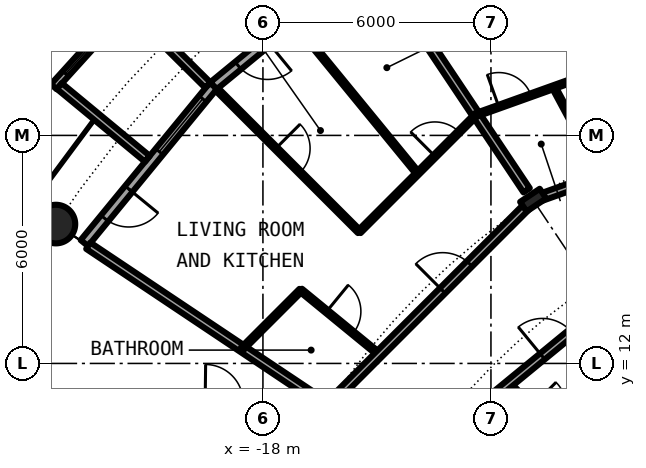
"""IFC4 building model, lengths in metres.
Left out: names, types, materials, properties, quantities, classifications, styles, units other than length and angle.
Written with IfcOpenShell. Run it as: python <this file> out.ifc"""

import sys

from ifc_helpers import new_model, si_unit, direction, frame, frame_2d, origin, origin_2d, place, context, subcontext, project, spatial, rectangle, circle, hollow_circle, i_section, extrude, element, fill, save


model = new_model("IFC4")
c1 = context("Model", 3, precision=1e-05, world=origin(), true_north=direction((0.0, 1.0)))
c2 = subcontext(c1, "Body", "Model", "MODEL_VIEW")
j1 = project(units=[si_unit("LENGTHUNIT", "METRE"), si_unit("PLANEANGLEUNIT", "RADIAN")], contexts=[c1])
p1 = place(None, origin())
s1 = spatial("IfcSite", under=j1, at=p1, CompositionType="ELEMENT")
p2 = place(p1, origin())
s2 = spatial("IfcBuilding", under=s1, at=p2, CompositionType="ELEMENT")
p3 = place(p2, frame((0.0, 0.0, 41.1)))
s3 = spatial("IfcBuildingStorey", under=s2, at=p3, CompositionType="ELEMENT", Elevation=41.1)
p4 = place(p3, frame((-23.448, 15.667, 0.0), z_axis=(0.0, 0.0, 1.0), x_axis=(1.0, 0.0, 0.0)))
e1 = element("IfcColumn", 1, at=p4, inside=s3, PredefinedType="COLUMN", context=c2, shape_type="SweptSolid", body=[
    extrude(hollow_circle(Radius=0.508, WallThickness=0.05, at=origin_2d()), origin(), (0.0, 0.0, 1.0), 3.05),
])
p5 = place(p3, frame((-10.889, 16.297, 0.0), z_axis=(0.0, 0.0, 1.0), x_axis=(-0.55557023302, 0.831469612303, 0.0)))
e2 = element("IfcColumn", 2, at=p5, inside=s3, PredefinedType="COLUMN", context=c2, shape_type="SweptSolid", body=[
    extrude(i_section(OverallWidth=0.305, OverallDepth=0.62, WebThickness=0.021, FlangeThickness=0.04, FilletRadius=0.027, at=origin_2d()), origin(), (0.0, 0.0, 1.0), 3.05),
])
p6 = place(p3, frame((-15.167, 22.699, 0.0), z_axis=(0.0, 0.0, 1.0), x_axis=(-0.773019449054, -0.634382322723, 0.0)))
e3 = element("IfcWall", 3, at=p6, inside=s3, PredefinedType="SOLIDWALL", context=c2, shape_type="SweptSolid", body=[
    extrude(rectangle(XDim=5.352, YDim=0.25, at=frame_2d((2.676, 0.0))), origin(), (0.0, 0.0, 1.0), 2.7),
])
p7 = place(p6, frame((0.441, 0.0, 0.3)))
e4 = element("IfcOpeningElement", 4, at=p7, cuts=e3, PredefinedType="OPENING", context=c2, shape_type="SweptSolid", body=[
    extrude(rectangle(XDim=1.8, YDim=2.1, at=frame_2d((0.9, 1.05))), frame((0.0, 0.135, 0.0), z_axis=(0.0, -1.0, 0.0), x_axis=(1.0, 0.0, 0.0)), (0.0, 0.0, 1.0), 0.27),
])
p8 = place(p6, frame((3.51, 0.0, 0.0)))
e5 = element("IfcOpeningElement", 5, at=p8, cuts=e3, PredefinedType="OPENING", context=c2, shape_type="SweptSolid", body=[
    extrude(rectangle(XDim=1.0, YDim=2.2, at=frame_2d((0.5, 1.1))), frame((0.0, 0.135, 0.0), z_axis=(0.0, -1.0, 0.0), x_axis=(1.0, 0.0, 0.0)), (0.0, 0.0, 1.0), 0.27),
])
p9 = place(p3, frame((-19.304, 19.304, 0.0), z_axis=(0.0, 0.0, 1.0), x_axis=(-0.634382322723, -0.773019449054, 0.0)))
e6 = element("IfcWall", 6, at=p9, inside=s3, PredefinedType="SOLIDWALL", context=c2, shape_type="SweptSolid", body=[
    extrude(rectangle(XDim=5.352, YDim=0.25, at=frame_2d((2.676, 0.0))), origin(), (0.0, 0.0, 1.0), 2.7),
])
p10 = place(p9, frame((0.441, 0.0, 0.3)))
e7 = element("IfcOpeningElement", 7, at=p10, cuts=e6, PredefinedType="OPENING", context=c2, shape_type="SweptSolid", body=[
    extrude(rectangle(XDim=1.8, YDim=2.1, at=frame_2d((0.9, 1.05))), frame((0.0, 0.135, 0.0), z_axis=(0.0, -1.0, 0.0), x_axis=(1.0, 0.0, 0.0)), (0.0, 0.0, 1.0), 0.27),
])
p11 = place(p9, frame((3.51, 0.0, 0.0)))
e8 = element("IfcOpeningElement", 8, at=p11, cuts=e6, PredefinedType="OPENING", context=c2, shape_type="SweptSolid", body=[
    extrude(rectangle(XDim=1.0, YDim=2.2, at=frame_2d((0.5, 1.1))), frame((0.0, 0.135, 0.0), z_axis=(0.0, -1.0, 0.0), x_axis=(1.0, 0.0, 0.0)), (0.0, 0.0, 1.0), 0.27),
])
p12 = place(p3, frame((-21.493, 21.5, -0.03), z_axis=(0.0, 0.0, 1.0), x_axis=(-0.671506829416, -0.740998365753, 0.0)))
e9 = element("IfcWall", 9, at=p12, inside=s3, PredefinedType="SOLIDWALL", context=c2, shape_type="SweptSolid", body=[
    extrude(rectangle(XDim=2.993, YDim=0.2, at=frame_2d((1.497, 0.0))), origin(), (0.0, 0.0, 1.0), 2.73),
])
p13 = place(p12, frame((0.457, 0.0, 0.33)))
e10 = element("IfcOpeningElement", 10, at=p13, cuts=e9, PredefinedType="OPENING", context=c2, shape_type="SweptSolid", body=[
    extrude(circle(Radius=1.04, at=frame_2d((1.04, 1.04))), frame((0.0, 0.11, 0.0), z_axis=(0.0, -1.0, 0.0), x_axis=(1.0, 0.0, 0.0)), (0.0, 0.0, 1.0), 0.22),
])
p14 = place(p3, frame((-19.45, 19.323, -0.03), z_axis=(0.0, 0.0, 1.0), x_axis=(-0.709727076896, 0.704476739375, 0.0)))
e11 = element("IfcWall", 11, at=p14, inside=s3, PredefinedType="SOLIDWALL", context=c2, shape_type="SweptSolid", body=[
    extrude(rectangle(XDim=2.883, YDim=0.2, at=frame_2d((1.441, 0.0))), origin(), (0.0, 0.0, 1.0), 2.73),
])
p15 = place(p3, frame((-21.041, 17.384, -0.03), z_axis=(0.0, 0.0, 1.0), x_axis=(-0.770784861449, 0.63709551667, 0.0)))
e12 = element("IfcWall", 12, at=p15, inside=s3, PredefinedType="SOLIDWALL", context=c2, shape_type="SweptSolid", body=[
    extrude(rectangle(XDim=3.006, YDim=0.2, at=frame_2d((1.503, 0.0))), origin(), (0.0, 0.0, 1.0), 2.73),
])
p16 = place(p3, frame((-22.595, 15.097, 0.0), z_axis=(0.0, 0.0, 1.0), x_axis=(0.831465568067, -0.555576285599, 0.0)))
e13 = element("IfcWall", 13, at=p16, inside=s3, PredefinedType="PARTITIONING", context=c2, shape_type="SweptSolid", body=[
    extrude(rectangle(XDim=7.264, YDim=0.2, at=frame_2d((3.632, 0.0))), origin(), (0.0, 0.0, 1.0), 2.7),
])
p17 = place(p3, frame((-19.216, 19.216, 0.0), z_axis=(0.0, 0.0, 1.0), x_axis=(0.707106781187, -0.707106781187, 0.0)))
e14 = element("IfcWall", 14, at=p17, inside=s3, PredefinedType="PARTITIONING", context=c2, shape_type="SweptSolid", body=[
    extrude(rectangle(XDim=5.305, YDim=0.1, at=frame_2d((2.652, 0.0))), origin(), (0.0, 0.0, 1.0), 2.7),
])
p18 = place(p17, frame((2.202, 0.0, 0.0)))
e15 = element("IfcOpeningElement", 15, at=p18, cuts=e14, PredefinedType="OPENING", context=c2, shape_type="SweptSolid", body=[
    extrude(rectangle(XDim=0.9, YDim=2.3, at=frame_2d((0.45, 1.15))), frame((0.0, 0.06, 0.0), z_axis=(0.0, -1.0, 0.0), x_axis=(1.0, 0.0, 0.0)), (0.0, 0.0, 1.0), 0.12),
])
p19 = place(p3, frame((-17.221, 21.022, 0.0), z_axis=(0.0, 0.0, 1.0), x_axis=(0.633662498939, -0.773609615658, 0.0)))
e16 = element("IfcWall", 16, at=p19, inside=s3, PredefinedType="PARTITIONING", context=c2, shape_type="SweptSolid", body=[
    extrude(rectangle(XDim=5.195, YDim=0.1, at=frame_2d((2.598, 0.0))), origin(), (0.0, 0.0, 1.0), 2.7),
])
p20 = place(p3, frame((-17.004, 13.927, 0.0), z_axis=(0.0, 0.0, 1.0), x_axis=(0.77367517848, -0.633582447834, 0.0)))
e17 = element("IfcWall", 17, at=p20, inside=s3, PredefinedType="PARTITIONING", context=c2, shape_type="SweptSolid", body=[
    extrude(rectangle(XDim=2.661, YDim=0.1, at=frame_2d((1.331, 0.0))), origin(), (0.0, 0.0, 1.0), 2.7),
])
p21 = place(p20, frame((0.881, 0.0, 0.0)))
e18 = element("IfcOpeningElement", 18, at=p21, cuts=e17, PredefinedType="OPENING", context=c2, shape_type="SweptSolid", body=[
    extrude(rectangle(XDim=0.9, YDim=2.3, at=frame_2d((0.45, 1.15))), frame((0.0, 0.06, 0.0), z_axis=(0.0, -1.0, 0.0), x_axis=(1.0, 0.0, 0.0)), (0.0, 0.0, 1.0), 0.12),
])
p22 = place(p3, frame((-15.097, 22.595, 0.0), z_axis=(0.0, 0.0, 1.0), x_axis=(0.555576285599, -0.831465568067, 0.0)))
e19 = element("IfcWall", 19, at=p22, inside=s3, PredefinedType="PARTITIONING", context=c2, shape_type="SweptSolid", body=[
    extrude(rectangle(XDim=7.264, YDim=0.2, at=frame_2d((3.632, 0.0))), origin(), (0.0, 0.0, 1.0), 2.7),
])
p23 = place(p3, frame((-11.524, 11.464, 0.0), z_axis=(0.0, 0.0, 1.0), x_axis=(0.708796844581, -0.705412668665, 0.0)))
e20 = element("IfcWall", 20, at=p23, inside=s3, PredefinedType="PARTITIONING", context=c2, shape_type="SweptSolid", body=[
    extrude(rectangle(XDim=2.597, YDim=0.1, at=frame_2d((1.299, 0.0))), origin(), (0.0, 0.0, 1.0), 2.7),
])
p24 = place(p23, frame((0.849, 0.0, 0.0)))
e21 = element("IfcOpeningElement", 21, at=p24, cuts=e20, PredefinedType="OPENING", context=c2, shape_type="SweptSolid", body=[
    extrude(rectangle(XDim=0.9, YDim=2.3, at=frame_2d((0.45, 1.15))), frame((0.0, 0.06, 0.0), z_axis=(0.0, -1.0, 0.0), x_axis=(1.0, 0.0, 0.0)), (0.0, 0.0, 1.0), 0.12),
])
p25 = place(p3, frame((-10.349, 19.272, 0.0), z_axis=(0.0, 0.0, 1.0), x_axis=(0.473203488521, -0.880953153381, 0.0)))
e22 = element("IfcWall", 22, at=p25, inside=s3, PredefinedType="PARTITIONING", context=c2, shape_type="SweptSolid", body=[
    extrude(rectangle(XDim=2.648, YDim=0.1, at=frame_2d((1.324, 0.0))), origin(), (0.0, 0.0, 1.0), 2.7),
])
p26 = place(p3, frame((-14.039, 9.4, 0.0), z_axis=(0.0, 0.0, 1.0), x_axis=(0.77298340166, 0.634426245326, 0.0)))
e23 = element("IfcWall", 23, at=p26, inside=s3, PredefinedType="PARTITIONING", context=c2, shape_type="SweptSolid", body=[
    extrude(rectangle(XDim=9.793, YDim=0.2, at=frame_2d((4.896, 0.0))), origin(), (0.0, 0.0, 1.0), 2.7),
])
p27 = place(p26, frame((4.389, 0.0, 0.0)))
e24 = element("IfcOpeningElement", 24, at=p27, cuts=e23, PredefinedType="OPENING", context=c2, shape_type="SweptSolid", body=[
    extrude(rectangle(XDim=1.0, YDim=2.3, at=frame_2d((0.5, 1.15))), frame((0.0, 0.11, 0.0), z_axis=(0.0, -1.0, 0.0), x_axis=(1.0, 0.0, 0.0)), (0.0, 0.0, 1.0), 0.22),
])
p28 = place(p3, frame((-10.742, 16.351, 0.0), z_axis=(0.0, 0.0, 1.0), x_axis=(0.941707755593, 0.336432018476, 0.0)))
e25 = element("IfcWall", 25, at=p28, inside=s3, PredefinedType="PARTITIONING", context=c2, shape_type="SweptSolid", body=[
    extrude(rectangle(XDim=9.381, YDim=0.2, at=frame_2d((4.69, 0.0))), origin(), (0.0, 0.0, 1.0), 2.38),
])
p29 = place(p28, frame((4.106, 0.0, 0.0)))
e26 = element("IfcOpeningElement", 26, at=p29, cuts=e25, PredefinedType="OPENING", context=c2, shape_type="SweptSolid", body=[
    extrude(rectangle(XDim=1.0, YDim=2.3, at=frame_2d((0.5, 1.15))), frame((0.0, 0.11, 0.0), z_axis=(0.0, -1.0, 0.0), x_axis=(1.0, 0.0, 0.0)), (0.0, 0.0, 1.0), 0.22),
])
p30 = place(p3, frame((-16.187, 10.999, 0.0), z_axis=(0.0, 0.0, 1.0), x_axis=(0.707106781187, 0.707106781187, 0.0)))
e27 = element("IfcWall", 27, at=p30, inside=s3, PredefinedType="PARTITIONING", context=c2, shape_type="SweptSolid", body=[
    extrude(rectangle(XDim=7.337, YDim=0.2, at=frame_2d((3.668, 0.0))), origin(), (0.0, 0.0, 1.0), 2.38),
])
p31 = place(p30, frame((4.124, 0.0, 0.0)))
e28 = element("IfcOpeningElement", 28, at=p31, cuts=e27, PredefinedType="OPENING", context=c2, shape_type="SweptSolid", body=[
    extrude(rectangle(XDim=1.0, YDim=2.3, at=frame_2d((0.5, 1.15))), frame((0.0, 0.11, 0.0), z_axis=(0.0, -1.0, 0.0), x_axis=(1.0, 0.0, 0.0)), (0.0, 0.0, 1.0), 0.22),
])
p32 = place(p3, frame((-12.393, 18.539, 0.0), z_axis=(0.0, 0.0, 1.0), x_axis=(0.941491894739, 0.337035624439, 0.0)))
e29 = element("IfcWall", 29, at=p32, inside=s3, PredefinedType="PARTITIONING", context=c2, shape_type="SweptSolid", body=[
    extrude(rectangle(XDim=4.335, YDim=0.1, at=frame_2d((2.167, 0.0))), origin(), (0.0, 0.0, 1.0), 2.7),
])
p33 = place(p32, frame((0.637, 0.0, 0.0)))
e30 = element("IfcOpeningElement", 30, at=p33, cuts=e29, PredefinedType="OPENING", context=c2, shape_type="SweptSolid", body=[
    extrude(rectangle(XDim=0.9, YDim=2.3, at=frame_2d((0.45, 1.15))), frame((0.0, 0.06, 0.0), z_axis=(0.0, -1.0, 0.0), x_axis=(1.0, 0.0, 0.0)), (0.0, 0.0, 1.0), 0.12),
])
p34 = place(p3, frame((-18.542, 12.389, 0.0), z_axis=(0.0, 0.0, 1.0), x_axis=(0.707106781187, 0.707106781187, 0.0)))
e31 = element("IfcWall", 31, at=p34, inside=s3, PredefinedType="PARTITIONING", context=c2, shape_type="SweptSolid", body=[
    extrude(rectangle(XDim=2.175, YDim=0.1, at=frame_2d((1.088, 0.0))), origin(), (0.0, 0.0, 1.0), 2.7),
])
p35 = place(p3, frame((-15.465, 15.465, 0.0), z_axis=(0.0, 0.0, 1.0), x_axis=(0.707022606819, 0.707190945535, 0.0)))
e32 = element("IfcWall", 32, at=p35, inside=s3, PredefinedType="PARTITIONING", context=c2, shape_type="SweptSolid", body=[
    extrude(rectangle(XDim=4.351, YDim=0.1, at=frame_2d((2.175, 0.0))), origin(), (0.0, 0.0, 1.0), 2.7),
])
p36 = place(p35, frame((2.813, 0.0, 0.0)))
e33 = element("IfcOpeningElement", 33, at=p36, cuts=e32, PredefinedType="OPENING", context=c2, shape_type="SweptSolid", body=[
    extrude(rectangle(XDim=0.9, YDim=2.3, at=frame_2d((0.45, 1.15))), frame((0.0, 0.06, 0.0), z_axis=(0.0, -1.0, 0.0), x_axis=(1.0, 0.0, 0.0)), (0.0, 0.0, 1.0), 0.12),
])
p37 = place(p8, origin())
e34 = element("IfcDoor", 34, at=p37, inside=s3, OperationType="SINGLE_SWING_LEFT", PredefinedType="DOOR", context=c2, shape_type="SweptSolid", body=[
    extrude(rectangle(XDim=1.0, YDim=2.2, at=frame_2d((0.5, 1.1))), frame((0.0, 0.025, 0.0), z_axis=(0.0, -1.0, 0.0), x_axis=(1.0, 0.0, 0.0)), (0.0, 0.0, 1.0), 0.05),
])
fill(e5, e34)
p38 = place(p10, origin())
e35 = element("IfcWindow", 35, at=p38, inside=s3, PartitioningType="SINGLE_PANEL", PredefinedType="WINDOW", context=c2, shape_type="SweptSolid", body=[
    extrude(rectangle(XDim=1.8, YDim=2.1, at=frame_2d((0.9, 1.05))), frame((0.0, 0.03, 0.0), z_axis=(0.0, -1.0, 0.0), x_axis=(1.0, 0.0, 0.0)), (0.0, 0.0, 1.0), 0.06),
])
fill(e7, e35)
p39 = place(p13, origin())
e36 = element("IfcWindow", 36, at=p39, inside=s3, PartitioningType="SINGLE_PANEL", PredefinedType="WINDOW", context=c2, shape_type="SweptSolid", body=[
    extrude(circle(Radius=1.04, at=frame_2d((1.04, 1.04))), frame((0.0, 0.03, 0.0), z_axis=(0.0, -1.0, 0.0), x_axis=(1.0, 0.0, 0.0)), (0.0, 0.0, 1.0), 0.06),
])
fill(e10, e36)
p40 = place(p11, origin())
e37 = element("IfcDoor", 37, at=p40, inside=s3, OperationType="SINGLE_SWING_LEFT", PredefinedType="DOOR", context=c2, shape_type="SweptSolid", body=[
    extrude(rectangle(XDim=1.0, YDim=2.2, at=frame_2d((0.5, 1.1))), frame((0.0, 0.025, 0.0), z_axis=(0.0, -1.0, 0.0), x_axis=(1.0, 0.0, 0.0)), (0.0, 0.0, 1.0), 0.05),
])
fill(e8, e37)
p41 = place(p33, origin())
e38 = element("IfcDoor", 38, at=p41, inside=s3, OperationType="SINGLE_SWING_LEFT", PredefinedType="DOOR", context=c2, shape_type="SweptSolid", body=[
    extrude(rectangle(XDim=0.9, YDim=2.3, at=frame_2d((0.45, 1.15))), frame((0.0, 0.025, 0.0), z_axis=(0.0, -1.0, 0.0), x_axis=(1.0, 0.0, 0.0)), (0.0, 0.0, 1.0), 0.05),
])
fill(e30, e38)
p42 = place(p31, origin())
e39 = element("IfcDoor", 39, at=p42, inside=s3, OperationType="SINGLE_SWING_RIGHT", PredefinedType="DOOR", context=c2, shape_type="SweptSolid", body=[
    extrude(rectangle(XDim=1.0, YDim=2.3, at=frame_2d((0.5, 1.15))), frame((0.0, 0.025, 0.0), z_axis=(0.0, -1.0, 0.0), x_axis=(1.0, 0.0, 0.0)), (0.0, 0.0, 1.0), 0.05),
])
fill(e28, e39)
p43 = place(p21, origin())
e40 = element("IfcDoor", 40, at=p43, inside=s3, OperationType="SINGLE_SWING_RIGHT", PredefinedType="DOOR", context=c2, shape_type="SweptSolid", body=[
    extrude(rectangle(XDim=0.9, YDim=2.3, at=frame_2d((0.45, 1.15))), frame((0.0, 0.025, 0.0), z_axis=(0.0, -1.0, 0.0), x_axis=(1.0, 0.0, 0.0)), (0.0, 0.0, 1.0), 0.05),
])
fill(e18, e40)
p44 = place(p18, origin())
e41 = element("IfcDoor", 41, at=p44, inside=s3, OperationType="SINGLE_SWING_LEFT", PredefinedType="DOOR", context=c2, shape_type="SweptSolid", body=[
    extrude(rectangle(XDim=0.9, YDim=2.3, at=frame_2d((0.45, 1.15))), frame((0.0, 0.025, 0.0), z_axis=(0.0, -1.0, 0.0), x_axis=(1.0, 0.0, 0.0)), (0.0, 0.0, 1.0), 0.05),
])
fill(e15, e41)
p45 = place(p36, origin())
e42 = element("IfcDoor", 42, at=p45, inside=s3, OperationType="SINGLE_SWING_RIGHT", PredefinedType="DOOR", context=c2, shape_type="SweptSolid", body=[
    extrude(rectangle(XDim=0.9, YDim=2.3, at=frame_2d((0.45, 1.15))), frame((0.0, 0.025, 0.0), z_axis=(0.0, -1.0, 0.0), x_axis=(1.0, 0.0, 0.0)), (0.0, 0.0, 1.0), 0.05),
])
fill(e33, e42)
p46 = place(p27, origin())
e43 = element("IfcDoor", 43, at=p46, inside=s3, OperationType="SINGLE_SWING_LEFT", PredefinedType="DOOR", context=c2, shape_type="SweptSolid", body=[
    extrude(rectangle(XDim=1.0, YDim=2.3, at=frame_2d((0.5, 1.15))), frame((0.0, 0.025, 0.0), z_axis=(0.0, -1.0, 0.0), x_axis=(1.0, 0.0, 0.0)), (0.0, 0.0, 1.0), 0.05),
])
fill(e24, e43)
save(model, sys.argv[1])
